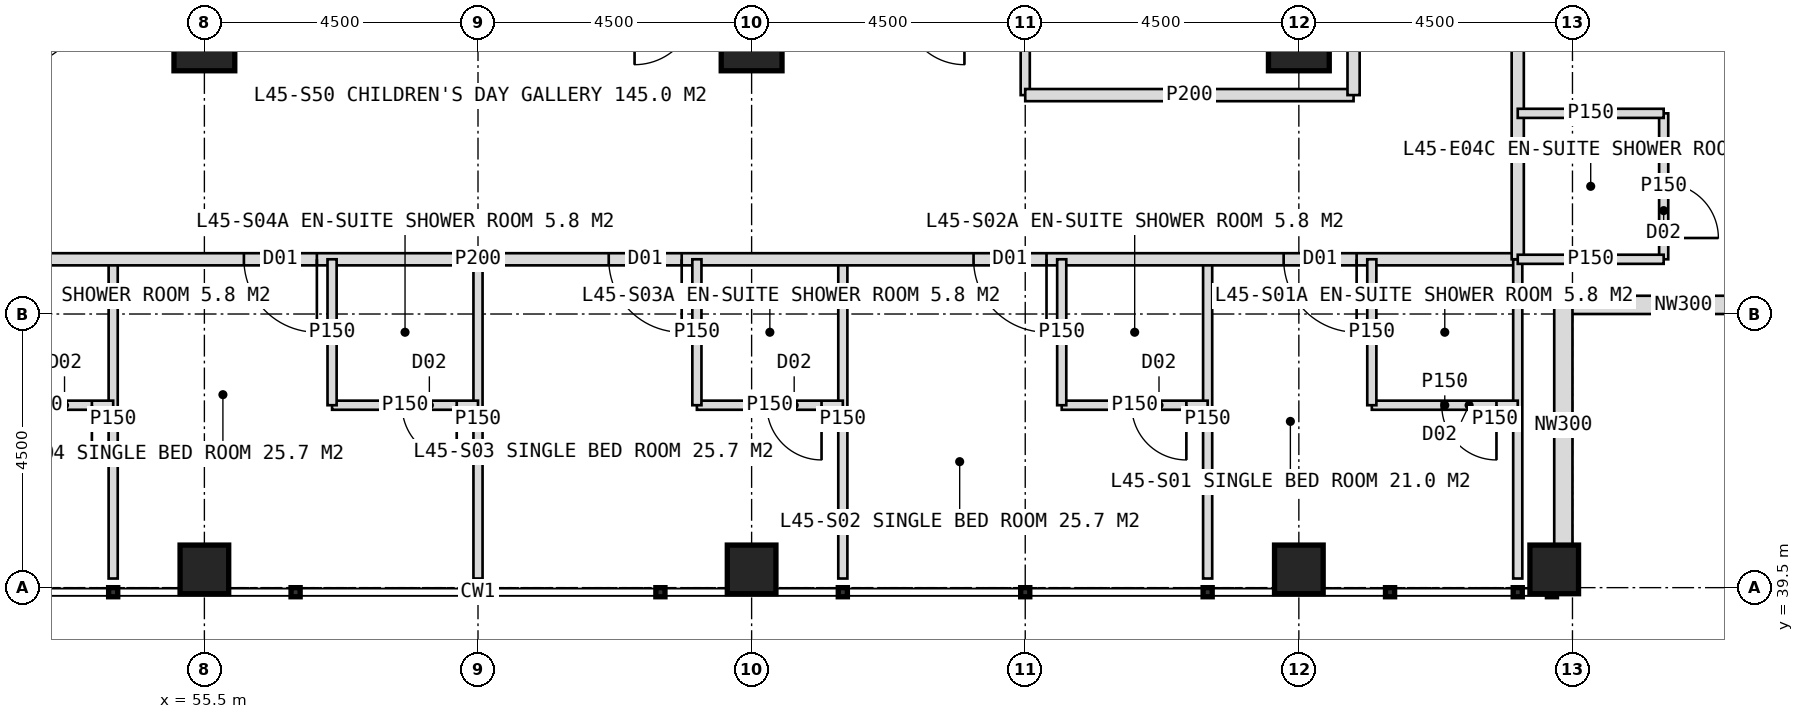
"""IFC4 building model, lengths in metres.
Left out: names, types, materials, properties, quantities, classifications, styles, units other than length and angle.
Written with IfcOpenShell. Run it as: python <this file> out.ifc"""

import sys

from ifc_helpers import new_model, si_unit, direction, frame, frame_2d, origin, origin_2d, place, context, subcontext, project, spatial, rectangle, hollow_rectangle, extrude, element, fill, save


model = new_model("IFC4")
c1 = context("Model", 3, precision=1e-05, world=origin(), true_north=direction((0.0, 1.0)))
c2 = subcontext(c1, "Body", "Model", "MODEL_VIEW")
j1 = project(units=[si_unit("LENGTHUNIT", "METRE"), si_unit("PLANEANGLEUNIT", "RADIAN")], contexts=[c1])
p1 = place(None, origin())
s1 = spatial("IfcSite", under=j1, at=p1, CompositionType="ELEMENT")
p2 = place(p1, origin())
s2 = spatial("IfcBuilding", under=s1, at=p2, CompositionType="ELEMENT")
p3 = place(p2, frame((0.0, 0.0, 189.0)))
s3 = spatial("IfcBuildingStorey", under=s2, at=p3, CompositionType="ELEMENT", Elevation=189.0)
for number, where, z_axis, x_axis in (
    (1, (73.5, 48.5, 0.0), (0.0, 0.0, 1.0), (1.0, 0.0, 0.0)),
    (2, (55.5, 48.5, 0.0), (0.0, 0.0, 1.0), (1.0, 0.0, 0.0)),
    (3, (64.5, 48.5, 0.0), (0.0, 0.0, 1.0), (1.0, 0.0, 0.0)),
):
    element("IfcColumn", number, at=place(p3, frame(where, z_axis=z_axis, x_axis=x_axis)), inside=s3, PredefinedType="COLUMN", context=c2, shape_type="SweptSolid", body=[
        extrude(hollow_rectangle(XDim=1.0, YDim=1.0, WallThickness=0.1, at=origin_2d()), origin(), (0.0, 0.0, 1.0), 4.0),
    ])
for number, where, z_axis, x_axis in (
    (4, (55.5, 39.8, 0.0), (0.0, 0.0, 1.0), (1.0, 0.0, 0.0)),
    (5, (64.5, 39.8, 0.0), (0.0, 0.0, 1.0), (1.0, 0.0, 0.0)),
    (6, (73.5, 39.8, 0.0), (0.0, 0.0, 1.0), (1.0, 0.0, 0.0)),
    (7, (77.7, 39.8, 0.0), (0.0, 0.0, 1.0), (1.0, 0.0, 0.0)),
):
    element("IfcColumn", number, at=place(p3, frame(where, z_axis=z_axis, x_axis=x_axis)), inside=s3, PredefinedType="COLUMN", context=c2, shape_type="SweptSolid", body=[
        extrude(hollow_rectangle(XDim=0.8, YDim=0.8, WallThickness=0.08, at=origin_2d()), origin(), (0.0, 0.0, 1.0), 4.0),
    ])
for number, where, z_axis, x_axis in (
    (8, (81.8, 44.15, 0.0), (0.0, 0.0, 1.0), (-1.0, 0.0, 0.0)),
    (9, (77.85, 44.15, 0.0), (0.0, 0.0, 1.0), (0.0, -1.0, 0.0)),
):
    element("IfcWall", number, at=place(p3, frame(where, z_axis=z_axis, x_axis=x_axis)), inside=s3, PredefinedType="ELEMENTEDWALL", context=c2, shape_type="SweptSolid", body=[
        extrude(rectangle(XDim=3.95, YDim=0.3, at=frame_2d((1.975, 0.0))), origin(), (0.0, 0.0, 1.0), 2.85),
    ])
for number, where, z_axis, x_axis in (
    (10, (72.0, 44.9, 0.0), (0.0, 0.0, 1.0), (0.0, -1.0, 0.0)),
    (11, (66.0, 44.9, 0.0), (0.0, 0.0, 1.0), (0.0, -1.0, 0.0)),
):
    element("IfcWall", number, at=place(p3, frame(where, z_axis=z_axis, x_axis=x_axis)), inside=s3, PredefinedType="PARTITIONING", context=c2, shape_type="SweptSolid", body=[
        extrude(rectangle(XDim=5.25, YDim=0.15, at=frame_2d((2.625, 0.0))), origin(), (0.0, 0.0, 1.0), 3.75),
    ])
p4 = place(p3, frame((60.0, 44.9, 0.0), z_axis=(0.0, 0.0, 1.0), x_axis=(0.0, -1.0, 0.0)))
e12 = element("IfcWall", 12, at=p4, inside=s3, PredefinedType="PARTITIONING", context=c2, shape_type="SweptSolid", body=[
    extrude(rectangle(XDim=5.25, YDim=0.15, at=frame_2d((2.625, 0.0))), origin(), (0.0, 0.0, 1.0), 2.95),
])
p5 = place(p3, frame((54.0, 44.9, 0.0), z_axis=(0.0, 0.0, 1.0), x_axis=(0.0, -1.0, 0.0)))
e13 = element("IfcWall", 13, at=p5, inside=s3, PredefinedType="PARTITIONING", context=c2, shape_type="SweptSolid", body=[
    extrude(rectangle(XDim=5.25, YDim=0.15, at=frame_2d((2.625, 0.0))), origin(), (0.0, 0.0, 1.0), 3.75),
])
p6 = place(p3, frame((77.1, 44.9, 0.0), z_axis=(0.0, 0.0, 1.0), x_axis=(-1.0, 0.0, 0.0)))
e14 = element("IfcWall", 14, at=p6, inside=s3, PredefinedType="PARTITIONING", context=c2, shape_type="SweptSolid", body=[
    extrude(rectangle(XDim=34.2, YDim=0.2, at=frame_2d((17.1, 0.0))), origin(), (0.0, 0.0, 1.0), 3.75),
])
p7 = place(p6, frame((2.65, 0.0, 0.0)))
e15 = element("IfcOpeningElement", 15, at=p7, cuts=e14, PredefinedType="OPENING", context=c2, shape_type="SweptSolid", body=[
    extrude(rectangle(XDim=1.2, YDim=2.2, at=frame_2d((0.6, 1.1))), frame((0.0, 0.11, 0.0), z_axis=(0.0, -1.0, 0.0), x_axis=(1.0, 0.0, 0.0)), (0.0, 0.0, 1.0), 0.22),
])
p8 = place(p6, frame((7.75, 0.0, 0.0)))
e16 = element("IfcOpeningElement", 16, at=p8, cuts=e14, PredefinedType="OPENING", context=c2, shape_type="SweptSolid", body=[
    extrude(rectangle(XDim=1.2, YDim=2.2, at=frame_2d((0.6, 1.1))), frame((0.0, 0.11, 0.0), z_axis=(0.0, -1.0, 0.0), x_axis=(1.0, 0.0, 0.0)), (0.0, 0.0, 1.0), 0.22),
])
p9 = place(p6, frame((13.75, 0.0, 0.0)))
e17 = element("IfcOpeningElement", 17, at=p9, cuts=e14, PredefinedType="OPENING", context=c2, shape_type="SweptSolid", body=[
    extrude(rectangle(XDim=1.2, YDim=2.2, at=frame_2d((0.6, 1.1))), frame((0.0, 0.11, 0.0), z_axis=(0.0, -1.0, 0.0), x_axis=(1.0, 0.0, 0.0)), (0.0, 0.0, 1.0), 0.22),
])
p10 = place(p6, frame((19.75, 0.0, 0.0)))
e18 = element("IfcOpeningElement", 18, at=p10, cuts=e14, PredefinedType="OPENING", context=c2, shape_type="SweptSolid", body=[
    extrude(rectangle(XDim=1.2, YDim=2.2, at=frame_2d((0.6, 1.1))), frame((0.0, 0.11, 0.0), z_axis=(0.0, -1.0, 0.0), x_axis=(1.0, 0.0, 0.0)), (0.0, 0.0, 1.0), 0.22),
])
p11 = place(p6, frame((25.75, 0.0, 0.0)))
e19 = element("IfcOpeningElement", 19, at=p11, cuts=e14, PredefinedType="OPENING", context=c2, shape_type="SweptSolid", body=[
    extrude(rectangle(XDim=1.2, YDim=2.2, at=frame_2d((0.6, 1.1))), frame((0.0, 0.11, 0.0), z_axis=(0.0, -1.0, 0.0), x_axis=(1.0, 0.0, 0.0)), (0.0, 0.0, 1.0), 0.22),
])
p12 = place(p3, frame((77.1, 44.9, 0.0), z_axis=(0.0, 0.0, 1.0), x_axis=(0.0, -1.0, 0.0)))
e20 = element("IfcWall", 20, at=p12, inside=s3, PredefinedType="PARTITIONING", context=c2, shape_type="SweptSolid", body=[
    extrude(rectangle(XDim=5.25, YDim=0.15, at=frame_2d((2.625, 0.0))), origin(), (0.0, 0.0, 1.0), 3.75),
])
p13 = place(p3, frame((77.1, 42.5, 0.0), z_axis=(0.0, 0.0, 1.0), x_axis=(-1.0, 0.0, 0.0)))
e21 = element("IfcWall", 21, at=p13, inside=s3, PredefinedType="PARTITIONING", context=c2, shape_type="SweptSolid", body=[
    extrude(rectangle(XDim=2.4, YDim=0.15, at=frame_2d((1.2, 0.0))), origin(), (0.0, 0.0, 1.0), 3.75),
])
p14 = place(p13, frame((0.35, 0.0, 0.0)))
e22 = element("IfcOpeningElement", 22, at=p14, cuts=e21, PredefinedType="OPENING", context=c2, shape_type="SweptSolid", body=[
    extrude(rectangle(XDim=0.9, YDim=2.1, at=frame_2d((0.45, 1.05))), frame((0.0, 0.085, 0.0), z_axis=(0.0, -1.0, 0.0), x_axis=(1.0, 0.0, 0.0)), (0.0, 0.0, 1.0), 0.17),
])
p15 = place(p3, frame((74.7, 44.9, 0.0), z_axis=(0.0, 0.0, 1.0), x_axis=(0.0, -1.0, 0.0)))
e23 = element("IfcWall", 23, at=p15, inside=s3, PredefinedType="PARTITIONING", context=c2, shape_type="SweptSolid", body=[
    extrude(rectangle(XDim=2.4, YDim=0.15, at=frame_2d((1.2, 0.0))), origin(), (0.0, 0.0, 1.0), 3.75),
])
p16 = place(p3, frame((72.0, 42.5, 0.0), z_axis=(0.0, 0.0, 1.0), x_axis=(-1.0, 0.0, 0.0)))
e24 = element("IfcWall", 24, at=p16, inside=s3, PredefinedType="PARTITIONING", context=c2, shape_type="SweptSolid", body=[
    extrude(rectangle(XDim=2.4, YDim=0.15, at=frame_2d((1.2, 0.0))), origin(), (0.0, 0.0, 1.0), 3.75),
])
p17 = place(p16, frame((0.35, 0.0, 0.0)))
e25 = element("IfcOpeningElement", 25, at=p17, cuts=e24, PredefinedType="OPENING", context=c2, shape_type="SweptSolid", body=[
    extrude(rectangle(XDim=0.9, YDim=2.1, at=frame_2d((0.45, 1.05))), frame((0.0, 0.085, 0.0), z_axis=(0.0, -1.0, 0.0), x_axis=(1.0, 0.0, 0.0)), (0.0, 0.0, 1.0), 0.17),
])
p18 = place(p3, frame((69.6, 44.9, 0.0), z_axis=(0.0, 0.0, 1.0), x_axis=(0.0, -1.0, 0.0)))
e26 = element("IfcWall", 26, at=p18, inside=s3, PredefinedType="PARTITIONING", context=c2, shape_type="SweptSolid", body=[
    extrude(rectangle(XDim=2.4, YDim=0.15, at=frame_2d((1.2, 0.0))), origin(), (0.0, 0.0, 1.0), 3.75),
])
p19 = place(p3, frame((66.0, 42.5, 0.0), z_axis=(0.0, 0.0, 1.0), x_axis=(-1.0, 0.0, 0.0)))
e27 = element("IfcWall", 27, at=p19, inside=s3, PredefinedType="PARTITIONING", context=c2, shape_type="SweptSolid", body=[
    extrude(rectangle(XDim=2.4, YDim=0.15, at=frame_2d((1.2, 0.0))), origin(), (0.0, 0.0, 1.0), 3.75),
])
p20 = place(p19, frame((0.35, 0.0, 0.0)))
e28 = element("IfcOpeningElement", 28, at=p20, cuts=e27, PredefinedType="OPENING", context=c2, shape_type="SweptSolid", body=[
    extrude(rectangle(XDim=0.9, YDim=2.1, at=frame_2d((0.45, 1.05))), frame((0.0, 0.085, 0.0), z_axis=(0.0, -1.0, 0.0), x_axis=(1.0, 0.0, 0.0)), (0.0, 0.0, 1.0), 0.17),
])
p21 = place(p3, frame((63.6, 44.9, 0.0), z_axis=(0.0, 0.0, 1.0), x_axis=(0.0, -1.0, 0.0)))
e29 = element("IfcWall", 29, at=p21, inside=s3, PredefinedType="PARTITIONING", context=c2, shape_type="SweptSolid", body=[
    extrude(rectangle(XDim=2.4, YDim=0.15, at=frame_2d((1.2, 0.0))), origin(), (0.0, 0.0, 1.0), 3.75),
])
p22 = place(p3, frame((60.0, 42.5, 0.0), z_axis=(0.0, 0.0, 1.0), x_axis=(-1.0, 0.0, 0.0)))
e30 = element("IfcWall", 30, at=p22, inside=s3, PredefinedType="PARTITIONING", context=c2, shape_type="SweptSolid", body=[
    extrude(rectangle(XDim=2.4, YDim=0.15, at=frame_2d((1.2, 0.0))), origin(), (0.0, 0.0, 1.0), 3.75),
])
p23 = place(p22, frame((0.35, 0.0, 0.0)))
e31 = element("IfcOpeningElement", 31, at=p23, cuts=e30, PredefinedType="OPENING", context=c2, shape_type="SweptSolid", body=[
    extrude(rectangle(XDim=0.9, YDim=2.1, at=frame_2d((0.45, 1.05))), frame((0.0, 0.085, 0.0), z_axis=(0.0, -1.0, 0.0), x_axis=(1.0, 0.0, 0.0)), (0.0, 0.0, 1.0), 0.17),
])
p24 = place(p3, frame((57.6, 44.9, 0.0), z_axis=(0.0, 0.0, 1.0), x_axis=(0.0, -1.0, 0.0)))
e32 = element("IfcWall", 32, at=p24, inside=s3, PredefinedType="PARTITIONING", context=c2, shape_type="SweptSolid", body=[
    extrude(rectangle(XDim=2.4, YDim=0.15, at=frame_2d((1.2, 0.0))), origin(), (0.0, 0.0, 1.0), 3.75),
])
p25 = place(p3, frame((54.0, 42.5, 0.0), z_axis=(0.0, 0.0, 1.0), x_axis=(-1.0, 0.0, 0.0)))
e33 = element("IfcWall", 33, at=p25, inside=s3, PredefinedType="PARTITIONING", context=c2, shape_type="SweptSolid", body=[
    extrude(rectangle(XDim=2.4, YDim=0.15, at=frame_2d((1.2, 0.0))), origin(), (0.0, 0.0, 1.0), 3.75),
])
p26 = place(p25, frame((0.35, 0.0, 0.0)))
e34 = element("IfcOpeningElement", 34, at=p26, cuts=e33, PredefinedType="OPENING", context=c2, shape_type="SweptSolid", body=[
    extrude(rectangle(XDim=0.9, YDim=2.1, at=frame_2d((0.45, 1.05))), frame((0.0, 0.085, 0.0), z_axis=(0.0, -1.0, 0.0), x_axis=(1.0, 0.0, 0.0)), (0.0, 0.0, 1.0), 0.17),
])
p27 = place(p3, frame((69.0, 53.0, 0.0), z_axis=(0.0, 0.0, 1.0), x_axis=(0.0, -1.0, 0.0)))
e35 = element("IfcWall", 35, at=p27, inside=s3, PredefinedType="PARTITIONING", context=c2, shape_type="SweptSolid", body=[
    extrude(rectangle(XDim=5.4, YDim=0.15, at=frame_2d((2.7, 0.0))), origin(), (0.0, 0.0, 1.0), 3.75),
])
p28 = place(p3, frame((74.4, 47.6, 0.0), z_axis=(0.0, 0.0, 1.0), x_axis=(-1.0, 0.0, 0.0)))
e36 = element("IfcWall", 36, at=p28, inside=s3, PredefinedType="PARTITIONING", context=c2, shape_type="SweptSolid", body=[
    extrude(rectangle(XDim=5.4, YDim=0.2, at=frame_2d((2.7, 0.0))), origin(), (0.0, 0.0, 1.0), 3.75),
])
p29 = place(p3, frame((77.1, 79.1, 0.0), z_axis=(0.0, 0.0, 1.0), x_axis=(0.0, -1.0, 0.0)))
e37 = element("IfcWall", 37, at=p29, inside=s3, PredefinedType="PARTITIONING", context=c2, shape_type="SweptSolid", body=[
    extrude(rectangle(XDim=34.2, YDim=0.2, at=frame_2d((17.1, 0.0))), origin(), (0.0, 0.0, 1.0), 3.75),
])
p30 = place(p29, frame((3.25, 0.0, 0.0)))
e38 = element("IfcOpeningElement", 38, at=p30, cuts=e37, PredefinedType="OPENING", context=c2, shape_type="SweptSolid", body=[
    extrude(rectangle(XDim=1.2, YDim=2.2, at=frame_2d((0.6, 1.1))), frame((0.0, 0.11, 0.0), z_axis=(0.0, -1.0, 0.0), x_axis=(1.0, 0.0, 0.0)), (0.0, 0.0, 1.0), 0.22),
])
p31 = place(p29, frame((11.35, 0.0, 0.0)))
e39 = element("IfcOpeningElement", 39, at=p31, cuts=e37, PredefinedType="OPENING", context=c2, shape_type="SweptSolid", body=[
    extrude(rectangle(XDim=1.2, YDim=2.2, at=frame_2d((0.6, 1.1))), frame((0.0, 0.11, 0.0), z_axis=(0.0, -1.0, 0.0), x_axis=(1.0, 0.0, 0.0)), (0.0, 0.0, 1.0), 0.22),
])
p32 = place(p29, frame((19.75, 0.0, 0.0)))
e40 = element("IfcOpeningElement", 40, at=p32, cuts=e37, PredefinedType="OPENING", context=c2, shape_type="SweptSolid", body=[
    extrude(rectangle(XDim=1.2, YDim=2.2, at=frame_2d((0.6, 1.1))), frame((0.0, 0.11, 0.0), z_axis=(0.0, -1.0, 0.0), x_axis=(1.0, 0.0, 0.0)), (0.0, 0.0, 1.0), 0.22),
])
p33 = place(p29, frame((25.75, 0.0, 0.0)))
e41 = element("IfcOpeningElement", 41, at=p33, cuts=e37, PredefinedType="OPENING", context=c2, shape_type="SweptSolid", body=[
    extrude(rectangle(XDim=1.2, YDim=2.2, at=frame_2d((0.6, 1.1))), frame((0.0, 0.11, 0.0), z_axis=(0.0, -1.0, 0.0), x_axis=(1.0, 0.0, 0.0)), (0.0, 0.0, 1.0), 0.22),
])
p34 = place(p3, frame((79.5, 47.3, 0.0), z_axis=(0.0, 0.0, 1.0), x_axis=(0.0, -1.0, 0.0)))
e42 = element("IfcWall", 42, at=p34, inside=s3, PredefinedType="PARTITIONING", context=c2, shape_type="SweptSolid", body=[
    extrude(rectangle(XDim=2.4, YDim=0.15, at=frame_2d((1.2, 0.0))), origin(), (0.0, 0.0, 1.0), 3.75),
])
p35 = place(p34, frame((1.15, 0.0, 0.0)))
e43 = element("IfcOpeningElement", 43, at=p35, cuts=e42, PredefinedType="OPENING", context=c2, shape_type="SweptSolid", body=[
    extrude(rectangle(XDim=0.9, YDim=2.1, at=frame_2d((0.45, 1.05))), frame((0.0, 0.085, 0.0), z_axis=(0.0, -1.0, 0.0), x_axis=(1.0, 0.0, 0.0)), (0.0, 0.0, 1.0), 0.17),
])
for number, where, z_axis, x_axis in (
    (44, (77.1, 47.3, 0.0), (0.0, 0.0, 1.0), (1.0, 0.0, 0.0)),
    (45, (77.1, 44.9, 0.0), (0.0, 0.0, 1.0), (1.0, 0.0, 0.0)),
):
    element("IfcWall", number, at=place(p3, frame(where, z_axis=z_axis, x_axis=x_axis)), inside=s3, PredefinedType="PARTITIONING", context=c2, shape_type="SweptSolid", body=[
        extrude(rectangle(XDim=2.4, YDim=0.15, at=frame_2d((1.2, 0.0))), origin(), (0.0, 0.0, 1.0), 3.75),
    ])
p36 = place(p3, frame((74.4, 62.0, 0.0), z_axis=(0.0, 0.0, 1.0), x_axis=(0.0, -1.0, 0.0)))
e46 = element("IfcWall", 46, at=p36, inside=s3, PredefinedType="PARTITIONING", context=c2, shape_type="SweptSolid", body=[
    extrude(rectangle(XDim=14.4, YDim=0.2, at=frame_2d((7.2, 0.0))), origin(), (0.0, 0.0, 1.0), 3.75),
])
p37 = place(p36, frame((2.5, 0.0, 0.0)))
e47 = element("IfcOpeningElement", 47, at=p37, cuts=e46, PredefinedType="OPENING", context=c2, shape_type="SweptSolid", body=[
    extrude(rectangle(XDim=1.0, YDim=2.1, at=frame_2d((0.5, 1.05))), frame((0.0, 0.11, 0.0), z_axis=(0.0, -1.0, 0.0), x_axis=(1.0, 0.0, 0.0)), (0.0, 0.0, 1.0), 0.22),
])
p38 = place(p36, frame((7.0, 0.0, 0.0)))
e48 = element("IfcOpeningElement", 48, at=p38, cuts=e46, PredefinedType="OPENING", context=c2, shape_type="SweptSolid", body=[
    extrude(rectangle(XDim=1.0, YDim=2.1, at=frame_2d((0.5, 1.05))), frame((0.0, 0.11, 0.0), z_axis=(0.0, -1.0, 0.0), x_axis=(1.0, 0.0, 0.0)), (0.0, 0.0, 1.0), 0.22),
])
p39 = place(p36, frame((11.2, 0.0, 0.0)))
e49 = element("IfcOpeningElement", 49, at=p39, cuts=e46, PredefinedType="OPENING", context=c2, shape_type="SweptSolid", body=[
    extrude(rectangle(XDim=1.0, YDim=2.1, at=frame_2d((0.5, 1.05))), frame((0.0, 0.11, 0.0), z_axis=(0.0, -1.0, 0.0), x_axis=(1.0, 0.0, 0.0)), (0.0, 0.0, 1.0), 0.22),
])
p40 = place(p7, origin())
e50 = element("IfcDoor", 50, at=p40, inside=s3, OperationType="SINGLE_SWING_LEFT", PredefinedType="DOOR", context=c2, shape_type="SweptSolid", body=[
    extrude(rectangle(XDim=1.2, YDim=2.2, at=frame_2d((0.6, 1.1))), frame((0.0, 0.025, 0.0), z_axis=(0.0, -1.0, 0.0), x_axis=(1.0, 0.0, 0.0)), (0.0, 0.0, 1.0), 0.05),
])
fill(e15, e50)
p41 = place(p14, origin())
e51 = element("IfcDoor", 51, at=p41, inside=s3, OperationType="SINGLE_SWING_LEFT", PredefinedType="DOOR", context=c2, shape_type="SweptSolid", body=[
    extrude(rectangle(XDim=0.9, YDim=2.1, at=frame_2d((0.45, 1.05))), frame((0.0, 0.025, 0.0), z_axis=(0.0, -1.0, 0.0), x_axis=(1.0, 0.0, 0.0)), (0.0, 0.0, 1.0), 0.05),
])
fill(e22, e51)
p42 = place(p8, origin())
e52 = element("IfcDoor", 52, at=p42, inside=s3, OperationType="SINGLE_SWING_LEFT", PredefinedType="DOOR", context=c2, shape_type="SweptSolid", body=[
    extrude(rectangle(XDim=1.2, YDim=2.2, at=frame_2d((0.6, 1.1))), frame((0.0, 0.025, 0.0), z_axis=(0.0, -1.0, 0.0), x_axis=(1.0, 0.0, 0.0)), (0.0, 0.0, 1.0), 0.05),
])
fill(e16, e52)
p43 = place(p17, origin())
e53 = element("IfcDoor", 53, at=p43, inside=s3, OperationType="SINGLE_SWING_LEFT", PredefinedType="DOOR", context=c2, shape_type="SweptSolid", body=[
    extrude(rectangle(XDim=0.9, YDim=2.1, at=frame_2d((0.45, 1.05))), frame((0.0, 0.025, 0.0), z_axis=(0.0, -1.0, 0.0), x_axis=(1.0, 0.0, 0.0)), (0.0, 0.0, 1.0), 0.05),
])
fill(e25, e53)
p44 = place(p9, origin())
e54 = element("IfcDoor", 54, at=p44, inside=s3, OperationType="SINGLE_SWING_LEFT", PredefinedType="DOOR", context=c2, shape_type="SweptSolid", body=[
    extrude(rectangle(XDim=1.2, YDim=2.2, at=frame_2d((0.6, 1.1))), frame((0.0, 0.025, 0.0), z_axis=(0.0, -1.0, 0.0), x_axis=(1.0, 0.0, 0.0)), (0.0, 0.0, 1.0), 0.05),
])
fill(e17, e54)
p45 = place(p20, origin())
e55 = element("IfcDoor", 55, at=p45, inside=s3, OperationType="SINGLE_SWING_LEFT", PredefinedType="DOOR", context=c2, shape_type="SweptSolid", body=[
    extrude(rectangle(XDim=0.9, YDim=2.1, at=frame_2d((0.45, 1.05))), frame((0.0, 0.025, 0.0), z_axis=(0.0, -1.0, 0.0), x_axis=(1.0, 0.0, 0.0)), (0.0, 0.0, 1.0), 0.05),
])
fill(e28, e55)
p46 = place(p10, origin())
e56 = element("IfcDoor", 56, at=p46, inside=s3, OperationType="SINGLE_SWING_LEFT", PredefinedType="DOOR", context=c2, shape_type="SweptSolid", body=[
    extrude(rectangle(XDim=1.2, YDim=2.2, at=frame_2d((0.6, 1.1))), frame((0.0, 0.025, 0.0), z_axis=(0.0, -1.0, 0.0), x_axis=(1.0, 0.0, 0.0)), (0.0, 0.0, 1.0), 0.05),
])
fill(e18, e56)
p47 = place(p23, origin())
e57 = element("IfcDoor", 57, at=p47, inside=s3, OperationType="SINGLE_SWING_LEFT", PredefinedType="DOOR", context=c2, shape_type="SweptSolid", body=[
    extrude(rectangle(XDim=0.9, YDim=2.1, at=frame_2d((0.45, 1.05))), frame((0.0, 0.025, 0.0), z_axis=(0.0, -1.0, 0.0), x_axis=(1.0, 0.0, 0.0)), (0.0, 0.0, 1.0), 0.05),
])
fill(e31, e57)
p48 = place(p26, origin())
e58 = element("IfcDoor", 58, at=p48, inside=s3, OperationType="SINGLE_SWING_LEFT", PredefinedType="DOOR", context=c2, shape_type="SweptSolid", body=[
    extrude(rectangle(XDim=0.9, YDim=2.1, at=frame_2d((0.45, 1.05))), frame((0.0, 0.025, 0.0), z_axis=(0.0, -1.0, 0.0), x_axis=(1.0, 0.0, 0.0)), (0.0, 0.0, 1.0), 0.05),
])
fill(e34, e58)
p49 = place(p35, origin())
e59 = element("IfcDoor", 59, at=p49, inside=s3, OperationType="SINGLE_SWING_RIGHT", PredefinedType="DOOR", context=c2, shape_type="SweptSolid", body=[
    extrude(rectangle(XDim=0.9, YDim=2.1, at=frame_2d((0.45, 1.05))), frame((0.0, 0.025, 0.0), z_axis=(0.0, -1.0, 0.0), x_axis=(1.0, 0.0, 0.0)), (0.0, 0.0, 1.0), 0.05),
])
fill(e43, e59)
save(model, sys.argv[1])
